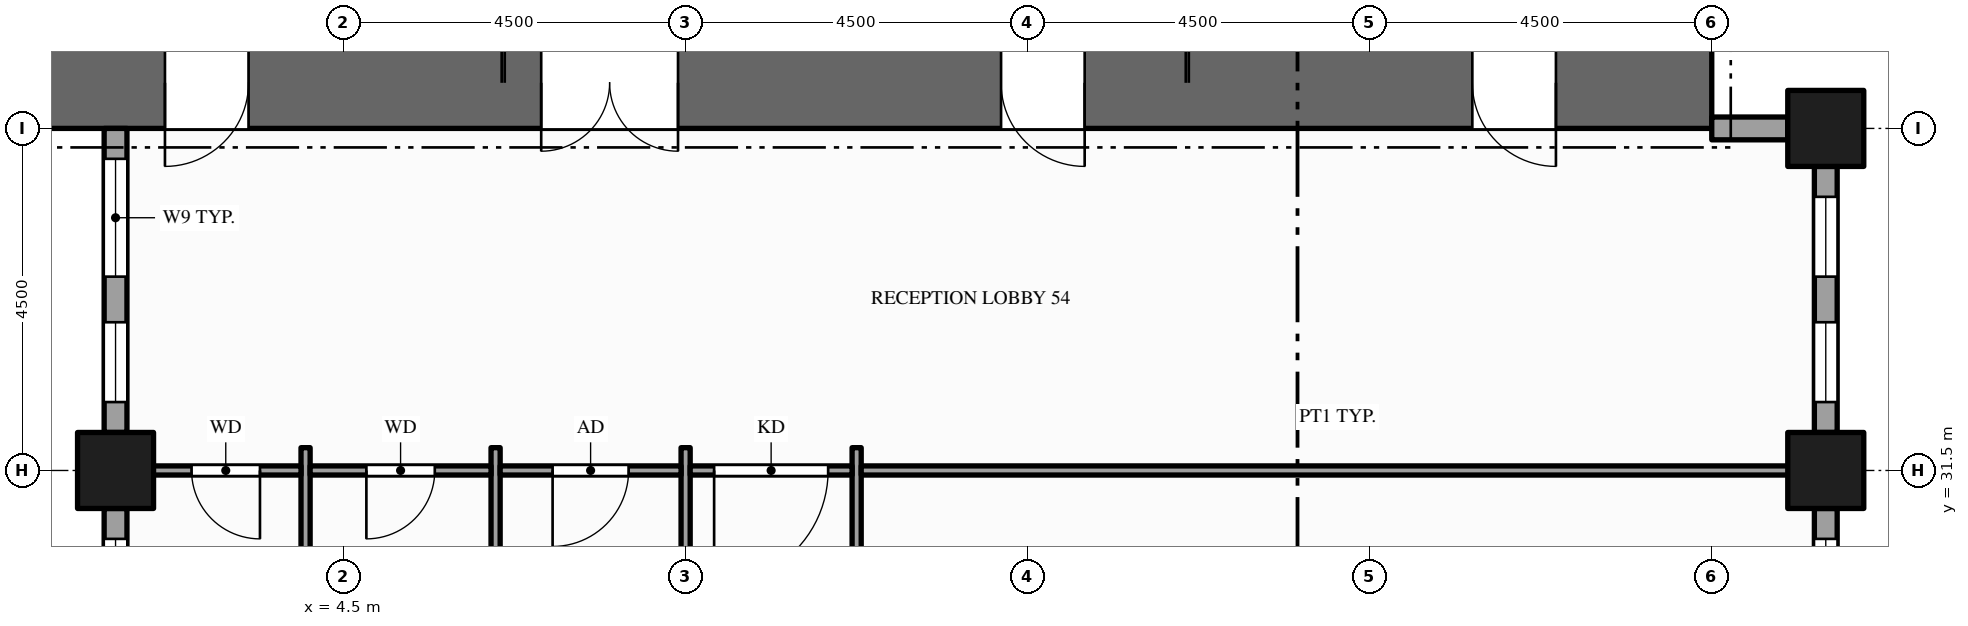
"""IFC4 building model, lengths in metres.
Left out: names, types, materials, properties, quantities, classifications, styles, units other than length and angle.
Written with IfcOpenShell. Run it as: python <this file> out.ifc"""

import sys

from ifc_helpers import new_model, si_unit, direction, frame, frame_2d, origin, origin_2d, place, context, subcontext, project, spatial, rectangle, hollow_rectangle, extrude, element, fill, save


model = new_model("IFC4")
c1 = context("Model", 3, precision=1e-05, world=origin(), true_north=direction((0.0, 1.0)))
c2 = subcontext(c1, "Body", "Model", "MODEL_VIEW")
j1 = project(units=[si_unit("LENGTHUNIT", "METRE"), si_unit("PLANEANGLEUNIT", "RADIAN")], contexts=[c1])
p1 = place(None, origin())
s1 = spatial("IfcSite", under=j1, at=p1, CompositionType="ELEMENT")
p2 = place(p1, origin())
s2 = spatial("IfcBuilding", under=s1, at=p2, CompositionType="ELEMENT")
p3 = place(p2, frame((0.0, 0.0, 127.0)))
s3 = spatial("IfcBuildingStorey", under=s2, at=p3, CompositionType="ELEMENT", Elevation=127.0)
p4 = place(p3, frame((0.0, 36.6, -0.15), z_axis=(0.0, 0.0, 1.0), x_axis=(1.0, 0.0, 0.0)))
e1 = element("IfcWall", 1, at=p4, inside=s3, PredefinedType="SHEAR", context=c2, shape_type="SweptSolid", body=[
    extrude(rectangle(XDim=22.5, YDim=1.2, at=frame_2d((11.25, 0.0))), origin(), (0.0, 0.0, 1.0), 4.0),
])
p5 = place(p4, frame((7.1, 0.0, 0.15)))
e2 = element("IfcOpeningElement", 2, at=p5, cuts=e1, PredefinedType="OPENING", context=c2, shape_type="SweptSolid", body=[
    extrude(rectangle(XDim=1.8, YDim=2.1, at=frame_2d((0.9, 1.05))), frame((0.0, 0.61, 0.0), z_axis=(0.0, -1.0, 0.0), x_axis=(1.0, 0.0, 0.0)), (0.0, 0.0, 1.0), 1.22),
])
p6 = place(p4, frame((13.15, 0.0, 0.15)))
e3 = element("IfcOpeningElement", 3, at=p6, cuts=e1, PredefinedType="OPENING", context=c2, shape_type="SweptSolid", body=[
    extrude(rectangle(XDim=1.1, YDim=2.1, at=frame_2d((0.55, 1.05))), frame((0.0, 0.61, 0.0), z_axis=(0.0, -1.0, 0.0), x_axis=(1.0, 0.0, 0.0)), (0.0, 0.0, 1.0), 1.22),
])
p7 = place(p4, frame((2.15, 0.0, 0.15)))
e4 = element("IfcOpeningElement", 4, at=p7, cuts=e1, PredefinedType="OPENING", context=c2, shape_type="SweptSolid", body=[
    extrude(rectangle(XDim=1.1, YDim=2.1, at=frame_2d((0.55, 1.05))), frame((0.0, 0.61, 0.0), z_axis=(0.0, -1.0, 0.0), x_axis=(1.0, 0.0, 0.0)), (0.0, 0.0, 1.0), 1.22),
])
p8 = place(p4, frame((19.35, 0.0, 0.15)))
e5 = element("IfcOpeningElement", 5, at=p8, cuts=e1, PredefinedType="OPENING", context=c2, shape_type="SweptSolid", body=[
    extrude(rectangle(XDim=1.1, YDim=2.1, at=frame_2d((0.55, 1.05))), frame((0.0, 0.61, 0.0), z_axis=(0.0, -1.0, 0.0), x_axis=(1.0, 0.0, 0.0)), (0.0, 0.0, 1.0), 1.22),
])
for number, where, z_axis, x_axis in (
    (6, (1.5, 31.5, -0.15), (0.0, 0.0, 1.0), (1.0, 0.0, 0.0)),
    (7, (24.0, 31.5, -0.15), (0.0, 0.0, 1.0), (1.0, 0.0, 0.0)),
    (8, (24.0, 36.0, -0.15), (0.0, 0.0, 1.0), (1.0, 0.0, 0.0)),
):
    element("IfcColumn", number, at=place(p3, frame(where, z_axis=z_axis, x_axis=x_axis)), inside=s3, PredefinedType="COLUMN", context=c2, shape_type="SweptSolid", body=[
        extrude(hollow_rectangle(XDim=1.0, YDim=1.0, WallThickness=0.05, at=origin_2d()), origin(), (0.0, 0.0, 1.0), 3.9),
    ])
p9 = place(p3, frame((24.0, 26.0, 0.0), z_axis=(0.0, 0.0, 1.0), x_axis=(0.0, 1.0, 0.0)))
e9 = element("IfcWall", 9, at=p9, inside=s3, PredefinedType="STANDARD", context=c2, shape_type="SweptSolid", body=[
    extrude(rectangle(XDim=5.0, YDim=0.3, at=frame_2d((2.5, 0.0))), origin(), (0.0, 0.0, 1.0), 3.054),
])
p10 = place(p9, frame((1.3, 0.0, 0.9)))
e10 = element("IfcOpeningElement", 10, at=p10, cuts=e9, PredefinedType="OPENING", context=c2, shape_type="SweptSolid", body=[
    extrude(rectangle(XDim=1.65, YDim=2.0, at=frame_2d((0.825, 1.0))), frame((0.0, 0.16, 0.0), z_axis=(0.0, -1.0, 0.0), x_axis=(1.0, 0.0, 0.0)), (0.0, 0.0, 1.0), 0.32),
])
p11 = place(p9, frame((3.55, 0.0, 0.9)))
e11 = element("IfcOpeningElement", 11, at=p11, cuts=e9, PredefinedType="OPENING", context=c2, shape_type="SweptSolid", body=[
    extrude(rectangle(XDim=1.05, YDim=2.0, at=frame_2d((0.525, 1.0))), frame((0.0, 0.16, 0.0), z_axis=(0.0, -1.0, 0.0), x_axis=(1.0, 0.0, 0.0)), (0.0, 0.0, 1.0), 0.32),
])
p12 = place(p3, frame((24.0, 32.0, 0.0), z_axis=(0.0, 0.0, 1.0), x_axis=(0.0, 1.0, 0.0)))
e12 = element("IfcWall", 12, at=p12, inside=s3, PredefinedType="STANDARD", context=c2, shape_type="SweptSolid", body=[
    extrude(rectangle(XDim=3.5, YDim=0.3, at=frame_2d((1.75, 0.0))), origin(), (0.0, 0.0, 1.0), 3.054),
])
p13 = place(p12, frame((0.4, 0.0, 0.9)))
e13 = element("IfcOpeningElement", 13, at=p13, cuts=e12, PredefinedType="OPENING", context=c2, shape_type="SweptSolid", body=[
    extrude(rectangle(XDim=1.05, YDim=2.0, at=frame_2d((0.525, 1.0))), frame((0.0, 0.16, 0.0), z_axis=(0.0, -1.0, 0.0), x_axis=(1.0, 0.0, 0.0)), (0.0, 0.0, 1.0), 0.32),
])
p14 = place(p12, frame((2.05, 0.0, 0.9)))
e14 = element("IfcOpeningElement", 14, at=p14, cuts=e12, PredefinedType="OPENING", context=c2, shape_type="SweptSolid", body=[
    extrude(rectangle(XDim=1.05, YDim=2.0, at=frame_2d((0.525, 1.0))), frame((0.0, 0.16, 0.0), z_axis=(0.0, -1.0, 0.0), x_axis=(1.0, 0.0, 0.0)), (0.0, 0.0, 1.0), 0.32),
])
p15 = place(p3, frame((23.5, 36.0, 0.0), z_axis=(0.0, 0.0, 1.0), x_axis=(-1.0, 0.0, 0.0)))
e15 = element("IfcWall", 15, at=p15, inside=s3, PredefinedType="STANDARD", context=c2, shape_type="SweptSolid", body=[
    extrude(rectangle(XDim=1.0, YDim=0.3, at=frame_2d((0.5, 0.0))), origin(), (0.0, 0.0, 1.0), 3.054),
])
p16 = place(p3, frame((1.5, 36.0, 0.0), z_axis=(0.0, 0.0, 1.0), x_axis=(0.0, -1.0, 0.0)))
e16 = element("IfcWall", 16, at=p16, inside=s3, PredefinedType="STANDARD", context=c2, shape_type="SweptSolid", body=[
    extrude(rectangle(XDim=4.0, YDim=0.3, at=frame_2d((2.0, 0.0))), origin(), (0.0, 0.0, 1.0), 3.054),
])
p17 = place(p16, frame((0.4, 0.0, 0.9)))
e17 = element("IfcOpeningElement", 17, at=p17, cuts=e16, PredefinedType="OPENING", context=c2, shape_type="SweptSolid", body=[
    extrude(rectangle(XDim=1.55, YDim=2.0, at=frame_2d((0.775, 1.0))), frame((0.0, 0.16, 0.0), z_axis=(0.0, -1.0, 0.0), x_axis=(1.0, 0.0, 0.0)), (0.0, 0.0, 1.0), 0.32),
])
p18 = place(p16, frame((2.55, 0.0, 0.9)))
e18 = element("IfcOpeningElement", 18, at=p18, cuts=e16, PredefinedType="OPENING", context=c2, shape_type="SweptSolid", body=[
    extrude(rectangle(XDim=1.05, YDim=2.0, at=frame_2d((0.525, 1.0))), frame((0.0, 0.16, 0.0), z_axis=(0.0, -1.0, 0.0), x_axis=(1.0, 0.0, 0.0)), (0.0, 0.0, 1.0), 0.32),
])
p19 = place(p3, frame((1.5, 31.0, 0.0), z_axis=(0.0, 0.0, 1.0), x_axis=(0.0, -1.0, 0.0)))
e19 = element("IfcWall", 19, at=p19, inside=s3, PredefinedType="STANDARD", context=c2, shape_type="SweptSolid", body=[
    extrude(rectangle(XDim=3.5, YDim=0.3, at=frame_2d((1.75, 0.0))), origin(), (0.0, 0.0, 1.0), 3.054),
])
p20 = place(p19, frame((0.4, 0.0, 0.9)))
e20 = element("IfcOpeningElement", 20, at=p20, cuts=e19, PredefinedType="OPENING", context=c2, shape_type="SweptSolid", body=[
    extrude(rectangle(XDim=1.05, YDim=2.0, at=frame_2d((0.525, 1.0))), frame((0.0, 0.16, 0.0), z_axis=(0.0, -1.0, 0.0), x_axis=(1.0, 0.0, 0.0)), (0.0, 0.0, 1.0), 0.32),
])
p21 = place(p19, frame((2.05, 0.0, 0.9)))
e21 = element("IfcOpeningElement", 21, at=p21, cuts=e19, PredefinedType="OPENING", context=c2, shape_type="SweptSolid", body=[
    extrude(rectangle(XDim=1.05, YDim=2.0, at=frame_2d((0.525, 1.0))), frame((0.0, 0.16, 0.0), z_axis=(0.0, -1.0, 0.0), x_axis=(1.0, 0.0, 0.0)), (0.0, 0.0, 1.0), 0.32),
])
for number, where, z_axis, x_axis in (
    (22, (4.0, 26.7, 0.0), (0.0, 0.0, 1.0), (0.0, 1.0, 0.0)),
    (23, (6.5, 26.7, 0.0), (0.0, 0.0, 1.0), (0.0, 1.0, 0.0)),
):
    element("IfcWall", number, at=place(p3, frame(where, z_axis=z_axis, x_axis=x_axis)), inside=s3, PredefinedType="PARTITIONING", context=c2, shape_type="SweptSolid", body=[
        extrude(rectangle(XDim=5.1, YDim=0.12, at=frame_2d((2.55, 0.0))), origin(), (0.0, 0.0, 1.0), 3.75),
    ])
p22 = place(p3, frame((9.0, 13.2, 0.0), z_axis=(0.0, 0.0, 1.0), x_axis=(0.0, 1.0, 0.0)))
e24 = element("IfcWall", 24, at=p22, inside=s3, PredefinedType="PARTITIONING", context=c2, shape_type="SweptSolid", body=[
    extrude(rectangle(XDim=18.6, YDim=0.12, at=frame_2d((9.3, 0.0))), origin(), (0.0, 0.0, 1.0), 2.5),
])
p23 = place(p22, frame((3.175, 0.0, 0.0)))
e25 = element("IfcOpeningElement", 25, at=p23, cuts=e24, PredefinedType="OPENING", context=c2, shape_type="SweptSolid", body=[
    extrude(rectangle(XDim=1.0, YDim=2.1, at=frame_2d((0.5, 1.05))), frame((0.0, 0.07, 0.0), z_axis=(0.0, -1.0, 0.0), x_axis=(1.0, 0.0, 0.0)), (0.0, 0.0, 1.0), 0.14),
])
p24 = place(p22, frame((9.955, 0.0, 0.0)))
e26 = element("IfcOpeningElement", 26, at=p24, cuts=e24, PredefinedType="OPENING", context=c2, shape_type="SweptSolid", body=[
    extrude(rectangle(XDim=1.0, YDim=2.1, at=frame_2d((0.5, 1.05))), frame((0.0, 0.07, 0.0), z_axis=(0.0, -1.0, 0.0), x_axis=(1.0, 0.0, 0.0)), (0.0, 0.0, 1.0), 0.14),
])
p25 = place(p3, frame((11.25, 13.2, 0.0), z_axis=(0.0, 0.0, 1.0), x_axis=(0.0, 1.0, 0.0)))
e27 = element("IfcWall", 27, at=p25, inside=s3, PredefinedType="PARTITIONING", context=c2, shape_type="SweptSolid", body=[
    extrude(rectangle(XDim=18.6, YDim=0.12, at=frame_2d((9.3, 0.0))), origin(), (0.0, 0.0, 1.0), 2.5),
])
p26 = place(p25, frame((4.2, 0.0, 0.0)))
e28 = element("IfcOpeningElement", 28, at=p26, cuts=e27, PredefinedType="OPENING", context=c2, shape_type="SweptSolid", body=[
    extrude(rectangle(XDim=1.2, YDim=2.1, at=frame_2d((0.6, 1.05))), frame((0.0, 0.07, 0.0), z_axis=(0.0, -1.0, 0.0), x_axis=(1.0, 0.0, 0.0)), (0.0, 0.0, 1.0), 0.14),
])
p27 = place(p3, frame((1.65, 31.5, 0.0), z_axis=(0.0, 0.0, 1.0), x_axis=(1.0, 0.0, 0.0)))
e29 = element("IfcWall", 29, at=p27, inside=s3, PredefinedType="PARTITIONING", context=c2, shape_type="SweptSolid", body=[
    extrude(rectangle(XDim=2.29, YDim=0.12, at=frame_2d((1.145, 0.0))), origin(), (0.0, 0.0, 1.0), 2.838),
])
p28 = place(p27, frame((0.85, 0.0, 0.0)))
e30 = element("IfcOpeningElement", 30, at=p28, cuts=e29, PredefinedType="OPENING", context=c2, shape_type="SweptSolid", body=[
    extrude(rectangle(XDim=0.9, YDim=2.1, at=frame_2d((0.45, 1.05))), frame((0.0, 0.07, 0.0), z_axis=(0.0, -1.0, 0.0), x_axis=(1.0, 0.0, 0.0)), (0.0, 0.0, 1.0), 0.14),
])
p29 = place(p3, frame((4.06, 31.5, 0.0), z_axis=(0.0, 0.0, 1.0), x_axis=(1.0, 0.0, 0.0)))
e31 = element("IfcWall", 31, at=p29, inside=s3, PredefinedType="PARTITIONING", context=c2, shape_type="SweptSolid", body=[
    extrude(rectangle(XDim=2.38, YDim=0.12, at=frame_2d((1.19, 0.0))), origin(), (0.0, 0.0, 1.0), 2.838),
])
p30 = place(p29, frame((0.74, 0.0, 0.0)))
e32 = element("IfcOpeningElement", 32, at=p30, cuts=e31, PredefinedType="OPENING", context=c2, shape_type="SweptSolid", body=[
    extrude(rectangle(XDim=0.9, YDim=2.1, at=frame_2d((0.45, 1.05))), frame((0.0, 0.07, 0.0), z_axis=(0.0, -1.0, 0.0), x_axis=(1.0, 0.0, 0.0)), (0.0, 0.0, 1.0), 0.14),
])
p31 = place(p3, frame((6.56, 31.5, 0.0), z_axis=(0.0, 0.0, 1.0), x_axis=(1.0, 0.0, 0.0)))
e33 = element("IfcWall", 33, at=p31, inside=s3, PredefinedType="PARTITIONING", context=c2, shape_type="SweptSolid", body=[
    extrude(rectangle(XDim=2.38, YDim=0.12, at=frame_2d((1.19, 0.0))), origin(), (0.0, 0.0, 1.0), 2.838),
])
p32 = place(p31, frame((0.69, 0.0, 0.0)))
e34 = element("IfcOpeningElement", 34, at=p32, cuts=e33, PredefinedType="OPENING", context=c2, shape_type="SweptSolid", body=[
    extrude(rectangle(XDim=1.0, YDim=2.1, at=frame_2d((0.5, 1.05))), frame((0.0, 0.07, 0.0), z_axis=(0.0, -1.0, 0.0), x_axis=(1.0, 0.0, 0.0)), (0.0, 0.0, 1.0), 0.14),
])
p33 = place(p3, frame((9.06, 31.5, 0.0), z_axis=(0.0, 0.0, 1.0), x_axis=(1.0, 0.0, 0.0)))
e35 = element("IfcWall", 35, at=p33, inside=s3, PredefinedType="PARTITIONING", context=c2, shape_type="SweptSolid", body=[
    extrude(rectangle(XDim=2.13, YDim=0.12, at=frame_2d((1.065, 0.0))), origin(), (0.0, 0.0, 1.0), 2.838),
])
p34 = place(p33, frame((0.315, 0.0, 0.0)))
e36 = element("IfcOpeningElement", 36, at=p34, cuts=e35, PredefinedType="OPENING", context=c2, shape_type="SweptSolid", body=[
    extrude(rectangle(XDim=1.5, YDim=2.1, at=frame_2d((0.75, 1.05))), frame((0.0, 0.07, 0.0), z_axis=(0.0, -1.0, 0.0), x_axis=(1.0, 0.0, 0.0)), (0.0, 0.0, 1.0), 0.14),
])
p35 = place(p3, frame((11.31, 31.5, 0.0), z_axis=(0.0, 0.0, 1.0), x_axis=(1.0, 0.0, 0.0)))
e37 = element("IfcWall", 37, at=p35, inside=s3, PredefinedType="PARTITIONING", context=c2, shape_type="SweptSolid", body=[
    extrude(rectangle(XDim=12.54, YDim=0.12, at=frame_2d((6.27, 0.0))), origin(), (0.0, 0.0, 1.0), 2.35),
])
p36 = place(p11, origin())
e38 = element("IfcWindow", 38, at=p36, inside=s3, PartitioningType="SINGLE_PANEL", PredefinedType="WINDOW", context=c2, shape_type="SweptSolid", body=[
    extrude(rectangle(XDim=1.05, YDim=2.0, at=frame_2d((0.525, 1.0))), frame((0.0, 0.03, 0.0), z_axis=(0.0, -1.0, 0.0), x_axis=(1.0, 0.0, 0.0)), (0.0, 0.0, 1.0), 0.06),
])
fill(e11, e38)
p37 = place(p13, origin())
e39 = element("IfcWindow", 39, at=p37, inside=s3, PartitioningType="SINGLE_PANEL", PredefinedType="WINDOW", context=c2, shape_type="SweptSolid", body=[
    extrude(rectangle(XDim=1.05, YDim=2.0, at=frame_2d((0.525, 1.0))), frame((0.0, 0.03, 0.0), z_axis=(0.0, -1.0, 0.0), x_axis=(1.0, 0.0, 0.0)), (0.0, 0.0, 1.0), 0.06),
])
fill(e13, e39)
p38 = place(p14, origin())
e40 = element("IfcWindow", 40, at=p38, inside=s3, PartitioningType="SINGLE_PANEL", PredefinedType="WINDOW", context=c2, shape_type="SweptSolid", body=[
    extrude(rectangle(XDim=1.05, YDim=2.0, at=frame_2d((0.525, 1.0))), frame((0.0, 0.03, 0.0), z_axis=(0.0, -1.0, 0.0), x_axis=(1.0, 0.0, 0.0)), (0.0, 0.0, 1.0), 0.06),
])
fill(e14, e40)
p39 = place(p17, origin())
e41 = element("IfcWindow", 41, at=p39, inside=s3, PartitioningType="SINGLE_PANEL", PredefinedType="WINDOW", context=c2, shape_type="SweptSolid", body=[
    extrude(rectangle(XDim=1.55, YDim=2.0, at=frame_2d((0.775, 1.0))), frame((0.0, 0.03, 0.0), z_axis=(0.0, -1.0, 0.0), x_axis=(1.0, 0.0, 0.0)), (0.0, 0.0, 1.0), 0.06),
])
fill(e17, e41)
p40 = place(p18, origin())
e42 = element("IfcWindow", 42, at=p40, inside=s3, PartitioningType="SINGLE_PANEL", PredefinedType="WINDOW", context=c2, shape_type="SweptSolid", body=[
    extrude(rectangle(XDim=1.05, YDim=2.0, at=frame_2d((0.525, 1.0))), frame((0.0, 0.03, 0.0), z_axis=(0.0, -1.0, 0.0), x_axis=(1.0, 0.0, 0.0)), (0.0, 0.0, 1.0), 0.06),
])
fill(e18, e42)
p41 = place(p20, origin())
e43 = element("IfcWindow", 43, at=p41, inside=s3, PartitioningType="SINGLE_PANEL", PredefinedType="WINDOW", context=c2, shape_type="SweptSolid", body=[
    extrude(rectangle(XDim=1.05, YDim=2.0, at=frame_2d((0.525, 1.0))), frame((0.0, 0.03, 0.0), z_axis=(0.0, -1.0, 0.0), x_axis=(1.0, 0.0, 0.0)), (0.0, 0.0, 1.0), 0.06),
])
fill(e20, e43)
p42 = place(p5, origin())
e44 = element("IfcDoor", 44, at=p42, inside=s3, OperationType="DOUBLE_DOOR_SINGLE_SWING", PredefinedType="DOOR", context=c2, shape_type="SweptSolid", body=[
    extrude(rectangle(XDim=1.8, YDim=2.1, at=frame_2d((0.9, 1.05))), frame((0.0, 0.025, 0.0), z_axis=(0.0, -1.0, 0.0), x_axis=(1.0, 0.0, 0.0)), (0.0, 0.0, 1.0), 0.05),
])
fill(e2, e44)
p43 = place(p6, origin())
e45 = element("IfcDoor", 45, at=p43, inside=s3, OperationType="SINGLE_SWING_RIGHT", PredefinedType="DOOR", context=c2, shape_type="SweptSolid", body=[
    extrude(rectangle(XDim=1.1, YDim=2.1, at=frame_2d((0.55, 1.05))), frame((0.0, 0.025, 0.0), z_axis=(0.0, -1.0, 0.0), x_axis=(1.0, 0.0, 0.0)), (0.0, 0.0, 1.0), 0.05),
])
fill(e3, e45)
p44 = place(p7, origin())
e46 = element("IfcDoor", 46, at=p44, inside=s3, OperationType="SINGLE_SWING_LEFT", PredefinedType="DOOR", context=c2, shape_type="SweptSolid", body=[
    extrude(rectangle(XDim=1.1, YDim=2.1, at=frame_2d((0.55, 1.05))), frame((0.0, 0.025, 0.0), z_axis=(0.0, -1.0, 0.0), x_axis=(1.0, 0.0, 0.0)), (0.0, 0.0, 1.0), 0.05),
])
fill(e4, e46)
p45 = place(p8, origin())
e47 = element("IfcDoor", 47, at=p45, inside=s3, OperationType="SINGLE_SWING_RIGHT", PredefinedType="DOOR", context=c2, shape_type="SweptSolid", body=[
    extrude(rectangle(XDim=1.1, YDim=2.1, at=frame_2d((0.55, 1.05))), frame((0.0, 0.025, 0.0), z_axis=(0.0, -1.0, 0.0), x_axis=(1.0, 0.0, 0.0)), (0.0, 0.0, 1.0), 0.05),
])
fill(e5, e47)
p46 = place(p34, origin())
e48 = element("IfcDoor", 48, at=p46, inside=s3, OperationType="SINGLE_SWING_LEFT", PredefinedType="DOOR", context=c2, shape_type="SweptSolid", body=[
    extrude(rectangle(XDim=1.5, YDim=2.1, at=frame_2d((0.75, 1.05))), frame((0.0, 0.025, 0.0), z_axis=(0.0, -1.0, 0.0), x_axis=(1.0, 0.0, 0.0)), (0.0, 0.0, 1.0), 0.05),
])
fill(e36, e48)
p47 = place(p28, origin())
e49 = element("IfcDoor", 49, at=p47, inside=s3, OperationType="SINGLE_SWING_RIGHT", PredefinedType="DOOR", context=c2, shape_type="SweptSolid", body=[
    extrude(rectangle(XDim=0.9, YDim=2.1, at=frame_2d((0.45, 1.05))), frame((0.0, 0.025, 0.0), z_axis=(0.0, -1.0, 0.0), x_axis=(1.0, 0.0, 0.0)), (0.0, 0.0, 1.0), 0.05),
])
fill(e30, e49)
p48 = place(p30, origin())
e50 = element("IfcDoor", 50, at=p48, inside=s3, OperationType="SINGLE_SWING_LEFT", PredefinedType="DOOR", context=c2, shape_type="SweptSolid", body=[
    extrude(rectangle(XDim=0.9, YDim=2.1, at=frame_2d((0.45, 1.05))), frame((0.0, 0.025, 0.0), z_axis=(0.0, -1.0, 0.0), x_axis=(1.0, 0.0, 0.0)), (0.0, 0.0, 1.0), 0.05),
])
fill(e32, e50)
p49 = place(p32, origin())
e51 = element("IfcDoor", 51, at=p49, inside=s3, OperationType="SINGLE_SWING_LEFT", PredefinedType="DOOR", context=c2, shape_type="SweptSolid", body=[
    extrude(rectangle(XDim=1.0, YDim=2.1, at=frame_2d((0.5, 1.05))), frame((0.0, 0.025, 0.0), z_axis=(0.0, -1.0, 0.0), x_axis=(1.0, 0.0, 0.0)), (0.0, 0.0, 1.0), 0.05),
])
fill(e34, e51)
save(model, sys.argv[1])
